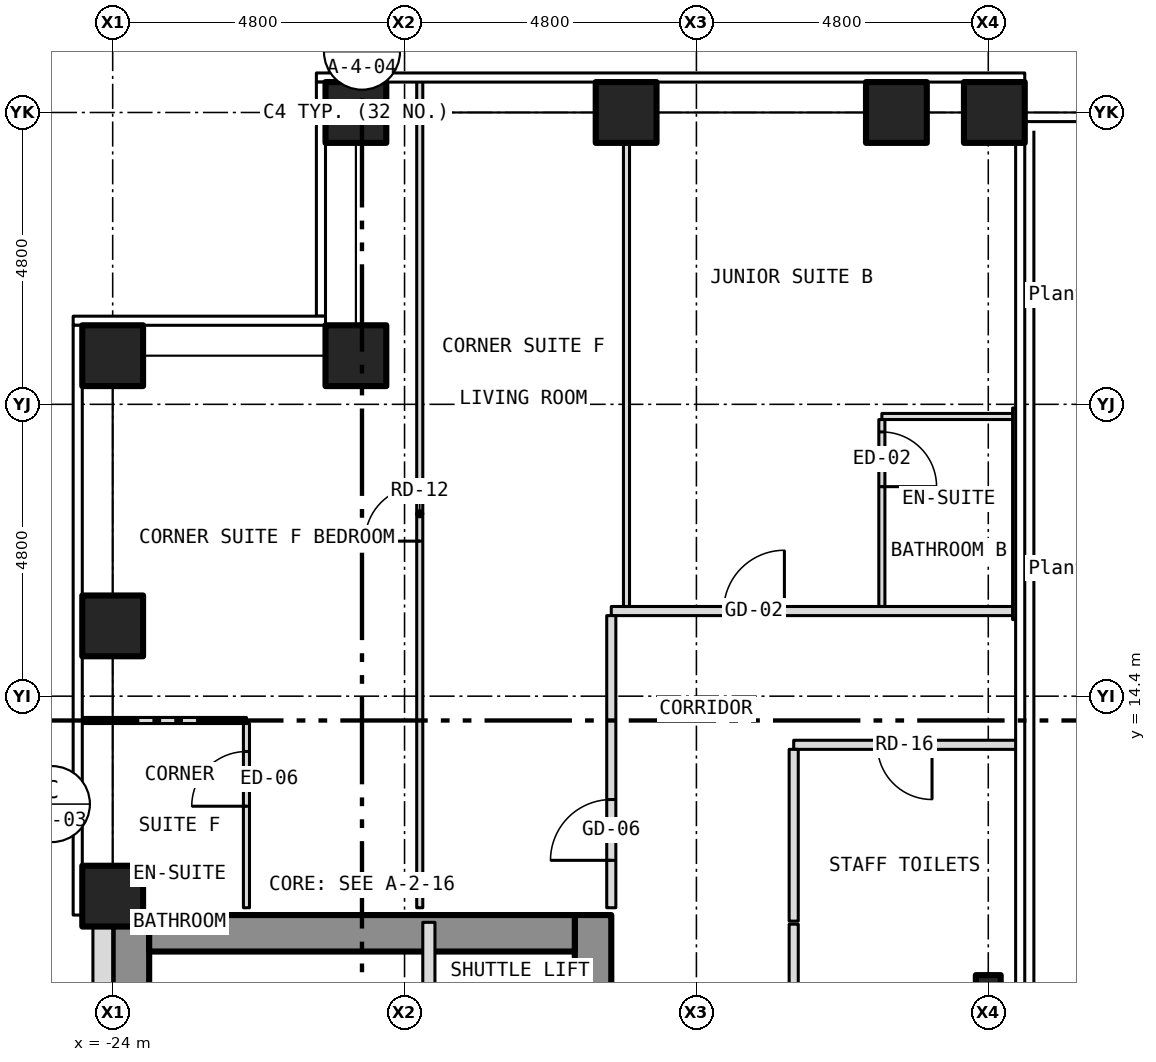
"""IFC4 building model, lengths in metres.
Left out: names, types, materials, properties, quantities, classifications, styles, units other than length and angle.
Written with IfcOpenShell. Run it as: python <this file> out.ifc"""

import sys

from ifc_helpers import new_model, si_unit, direction, frame, frame_2d, origin, origin_2d, place, context, subcontext, project, spatial, rectangle, hollow_rectangle, i_section, extrude, element, fill, save


model = new_model("IFC4")
c1 = context("Model", 3, precision=1e-05, world=origin(), true_north=direction((0.0, 1.0)))
c2 = subcontext(c1, "Body", "Model", "MODEL_VIEW")
j1 = project(units=[si_unit("LENGTHUNIT", "METRE"), si_unit("PLANEANGLEUNIT", "RADIAN")], contexts=[c1])
p1 = place(None, origin())
s1 = spatial("IfcSite", under=j1, at=p1, CompositionType="ELEMENT")
p2 = place(p1, origin())
s2 = spatial("IfcBuilding", under=s1, at=p2, CompositionType="ELEMENT")
p3 = place(p2, frame((0.0, 0.0, 60.0)))
s3 = spatial("IfcBuildingStorey", under=s2, at=p3, CompositionType="ELEMENT", Elevation=60.0)
for number, where, z_axis, x_axis in (
    (1, (-20.0, 24.0, -0.15), (0.0, 0.0, 1.0), (1.0, 0.0, 0.0)),
    (2, (-15.556, 24.0, -0.15), (0.0, 0.0, 1.0), (1.0, 0.0, 0.0)),
    (3, (-11.111, 24.0, -0.15), (0.0, 0.0, 1.0), (1.0, 0.0, 0.0)),
    (4, (-24.0, 11.111, -0.15), (0.0, 0.0, 1.0), (1.0, 0.0, 0.0)),
    (5, (-24.0, 15.556, -0.15), (0.0, 0.0, 1.0), (1.0, 0.0, 0.0)),
    (6, (-24.0, 20.0, -0.15), (0.0, 0.0, 1.0), (1.0, 0.0, 0.0)),
    (7, (-20.0, 20.0, -0.15), (0.0, 0.0, 1.0), (1.0, 0.0, 0.0)),
    (8, (-9.5, 24.0, -0.15), (0.0, 0.0, 1.0), (1.0, 0.0, 0.0)),
):
    element("IfcColumn", number, at=place(p3, frame(where, z_axis=z_axis, x_axis=x_axis)), inside=s3, PredefinedType="COLUMN", context=c2, shape_type="SweptSolid", body=[
        extrude(hollow_rectangle(XDim=1.0, YDim=1.0, WallThickness=0.06, at=origin_2d()), origin(), (0.0, 0.0, 1.0), 3.5),
    ])
p4 = place(p3, frame((-9.6, 9.6, -0.15), z_axis=(0.0, 0.0, 1.0), x_axis=(1.0, 0.0, 0.0)))
e9 = element("IfcColumn", 9, at=p4, inside=s3, PredefinedType="COLUMN", context=c2, shape_type="SweptSolid", body=[
    extrude(i_section(OverallWidth=0.409, OverallDepth=0.424, WebThickness=0.033, FlangeThickness=0.052, at=origin_2d()), origin(), (0.0, 0.0, 1.0), 3.5),
])
p5 = place(p3, frame((-16.1, -10.8, 0.0), z_axis=(0.0, 0.0, 1.0), x_axis=(0.0, 1.0, 0.0)))
e10 = element("IfcWall", 10, at=p5, inside=s3, PredefinedType="SHEAR", context=c2, shape_type="SweptSolid", body=[
    extrude(rectangle(XDim=21.6, YDim=0.6, at=frame_2d((10.8, 0.0))), origin(), (0.0, 0.0, 1.0), 3.25),
])
p6 = place(p5, frame((9.4, 0.0, 0.0)))
e11 = element("IfcOpeningElement", 11, at=p6, cuts=e10, PredefinedType="OPENING", context=c2, shape_type="SweptSolid", body=[
    extrude(rectangle(XDim=1.1, YDim=2.1, at=frame_2d((0.55, 1.05))), frame((0.0, 0.312, 0.0), z_axis=(0.0, -1.0, 0.0), x_axis=(1.0, 0.0, 0.0)), (0.0, 0.0, 1.0), 0.624),
])
p7 = place(p5, frame((11.5, 0.0, 0.0)))
e12 = element("IfcOpeningElement", 12, at=p7, cuts=e10, PredefinedType="OPENING", context=c2, shape_type="SweptSolid", body=[
    extrude(rectangle(XDim=1.1, YDim=2.1, at=frame_2d((0.55, 1.05))), frame((0.0, 0.312, 0.0), z_axis=(0.0, -1.0, 0.0), x_axis=(1.0, 0.0, 0.0)), (0.0, 0.0, 1.0), 0.624),
])
p8 = place(p5, frame((13.6, 0.0, 0.0)))
e13 = element("IfcOpeningElement", 13, at=p8, cuts=e10, PredefinedType="OPENING", context=c2, shape_type="SweptSolid", body=[
    extrude(rectangle(XDim=1.1, YDim=2.1, at=frame_2d((0.55, 1.05))), frame((0.0, 0.312, 0.0), z_axis=(0.0, -1.0, 0.0), x_axis=(1.0, 0.0, 0.0)), (0.0, 0.0, 1.0), 0.624),
])
p9 = place(p5, frame((15.7, 0.0, 0.0)))
e14 = element("IfcOpeningElement", 14, at=p9, cuts=e10, PredefinedType="OPENING", context=c2, shape_type="SweptSolid", body=[
    extrude(rectangle(XDim=1.1, YDim=2.1, at=frame_2d((0.55, 1.05))), frame((0.0, 0.312, 0.0), z_axis=(0.0, -1.0, 0.0), x_axis=(1.0, 0.0, 0.0)), (0.0, 0.0, 1.0), 0.624),
])
p10 = place(p5, frame((17.8, 0.0, 0.0)))
e15 = element("IfcOpeningElement", 15, at=p10, cuts=e10, PredefinedType="OPENING", context=c2, shape_type="SweptSolid", body=[
    extrude(rectangle(XDim=1.1, YDim=2.1, at=frame_2d((0.55, 1.05))), frame((0.0, 0.312, 0.0), z_axis=(0.0, -1.0, 0.0), x_axis=(1.0, 0.0, 0.0)), (0.0, 0.0, 1.0), 0.624),
])
p11 = place(p5, frame((0.758, 0.0, 0.0)))
e16 = element("IfcOpeningElement", 16, at=p11, cuts=e10, PredefinedType="OPENING", context=c2, shape_type="SweptSolid", body=[
    extrude(rectangle(XDim=1.1, YDim=2.1, at=frame_2d((0.55, 1.05))), frame((0.0, 0.312, 0.0), z_axis=(0.0, -1.0, 0.0), x_axis=(1.0, 0.0, 0.0)), (0.0, 0.0, 1.0), 0.624),
])
p12 = place(p5, frame((7.5, 0.0, 0.0)))
e17 = element("IfcOpeningElement", 17, at=p12, cuts=e10, PredefinedType="OPENING", context=c2, shape_type="SweptSolid", body=[
    extrude(rectangle(XDim=1.1, YDim=2.1, at=frame_2d((0.55, 1.05))), frame((0.0, 0.312, 0.0), z_axis=(0.0, -1.0, 0.0), x_axis=(1.0, 0.0, 0.0)), (0.0, 0.0, 1.0), 0.624),
])
p13 = place(p3, frame((-23.7, -10.8, 0.0), z_axis=(0.0, 0.0, 1.0), x_axis=(0.0, 1.0, 0.0)))
e18 = element("IfcWall", 18, at=p13, inside=s3, PredefinedType="SHEAR", context=c2, shape_type="SweptSolid", body=[
    extrude(rectangle(XDim=21.6, YDim=0.6, at=frame_2d((10.8, 0.0))), origin(), (0.0, 0.0, 1.0), 3.25),
])
p14 = place(p3, frame((-23.4, 10.5, 0.0), z_axis=(0.0, 0.0, 1.0), x_axis=(1.0, 0.0, 0.0)))
e19 = element("IfcWall", 19, at=p14, inside=s3, PredefinedType="SHEAR", context=c2, shape_type="SweptSolid", body=[
    extrude(rectangle(XDim=7.0, YDim=0.6, at=frame_2d((3.5, 0.0))), origin(), (0.0, 0.0, 1.0), 3.25),
])
p15 = place(p3, frame((-24.163, 10.8, 0.0), z_axis=(0.0, 0.0, 1.0), x_axis=(0.0, -1.0, 0.0)))
e20 = element("IfcWall", 20, at=p15, inside=s3, PredefinedType="SOLIDWALL", context=c2, shape_type="SweptSolid", body=[
    extrude(rectangle(XDim=21.6, YDim=0.325, at=frame_2d((10.8, 0.0))), origin(), (0.0, 0.0, 1.0), 3.5),
])
p16 = place(p15, frame((18.05, 0.0, 1.0)))
e21 = element("IfcOpeningElement", 21, at=p16, cuts=e20, PredefinedType="OPENING", context=c2, shape_type="SweptSolid", body=[
    extrude(rectangle(XDim=0.6, YDim=1.5, at=frame_2d((0.3, 0.75))), frame((0.0, 0.175, 0.0), z_axis=(0.0, -1.0, 0.0), x_axis=(1.0, 0.0, 0.0)), (0.0, 0.0, 1.0), 0.349),
])
p17 = place(p3, frame((-12.8, 13.6, 0.0), z_axis=(0.0, 0.0, 1.0), x_axis=(1.0, 0.0, 0.0)))
e22 = element("IfcWall", 22, at=p17, inside=s3, PredefinedType="PARTITIONING", context=c2, shape_type="SweptSolid", body=[
    extrude(rectangle(XDim=3.68, YDim=0.15, at=frame_2d((1.84, 0.0))), origin(), (0.0, 0.0, 1.0), 3.35),
])
p18 = place(p17, frame((1.375, 0.0, 0.0)))
e23 = element("IfcOpeningElement", 23, at=p18, cuts=e22, PredefinedType="OPENING", context=c2, shape_type="SweptSolid", body=[
    extrude(rectangle(XDim=0.9, YDim=2.1, at=frame_2d((0.45, 1.05))), frame((0.0, 0.087, 0.0), z_axis=(0.0, -1.0, 0.0), x_axis=(1.0, 0.0, 0.0)), (0.0, 0.0, 1.0), 0.174),
])
p19 = place(p3, frame((-24.53, 14.0, 0.0), z_axis=(0.0, 0.0, 1.0), x_axis=(1.0, 0.0, 0.0)))
e24 = element("IfcWall", 24, at=p19, inside=s3, PredefinedType="PARTITIONING", context=c2, shape_type="SweptSolid", body=[
    extrude(rectangle(XDim=2.73, YDim=0.1, at=frame_2d((1.365, 0.0))), origin(), (0.0, 0.0, 1.0), 3.35),
])
p20 = place(p3, frame((-15.8, 15.8, 0.0), z_axis=(0.0, 0.0, 1.0), x_axis=(1.0, 0.0, 0.0)))
e25 = element("IfcWall", 25, at=p20, inside=s3, PredefinedType="PARTITIONING", context=c2, shape_type="SweptSolid", body=[
    extrude(rectangle(XDim=6.65, YDim=0.15, at=frame_2d((3.325, 0.0))), origin(), (0.0, 0.0, 1.0), 3.35),
])
p21 = place(p20, frame((1.847, 0.0, 0.0)))
e26 = element("IfcOpeningElement", 26, at=p21, cuts=e25, PredefinedType="OPENING", context=c2, shape_type="SweptSolid", body=[
    extrude(rectangle(XDim=1.0, YDim=2.1, at=frame_2d((0.5, 1.05))), frame((0.0, 0.087, 0.0), z_axis=(0.0, -1.0, 0.0), x_axis=(1.0, 0.0, 0.0)), (0.0, 0.0, 1.0), 0.174),
])
p22 = place(p3, frame((-11.35, 19.0, 0.0), z_axis=(0.0, 0.0, 1.0), x_axis=(1.0, 0.0, 0.0)))
e27 = element("IfcWall", 27, at=p22, inside=s3, PredefinedType="PARTITIONING", context=c2, shape_type="SweptSolid", body=[
    extrude(rectangle(XDim=2.2, YDim=0.1, at=frame_2d((1.1, 0.0))), origin(), (0.0, 0.0, 1.0), 3.35),
])
p23 = place(p3, frame((-21.8, 10.92, 0.0), z_axis=(0.0, 0.0, 1.0), x_axis=(0.0, 1.0, 0.0)))
e28 = element("IfcWall", 28, at=p23, inside=s3, PredefinedType="PARTITIONING", context=c2, shape_type="SweptSolid", body=[
    extrude(rectangle(XDim=3.03, YDim=0.1, at=frame_2d((1.515, 0.0))), origin(), (0.0, 0.0, 1.0), 3.35),
])
p24 = place(p23, frame((1.67, 0.0, 0.0)))
e29 = element("IfcOpeningElement", 29, at=p24, cuts=e28, PredefinedType="OPENING", context=c2, shape_type="SweptSolid", body=[
    extrude(rectangle(XDim=0.9, YDim=2.1, at=frame_2d((0.45, 1.05))), frame((0.0, 0.062, 0.0), z_axis=(0.0, -1.0, 0.0), x_axis=(1.0, 0.0, 0.0)), (0.0, 0.0, 1.0), 0.124),
])
p25 = place(p3, frame((-18.95, 10.92, 0.0), z_axis=(0.0, 0.0, 1.0), x_axis=(0.0, 1.0, 0.0)))
e30 = element("IfcWall", 30, at=p25, inside=s3, PredefinedType="PARTITIONING", context=c2, shape_type="SweptSolid", body=[
    extrude(rectangle(XDim=13.61, YDim=0.1, at=frame_2d((6.805, 0.0))), origin(), (0.0, 0.0, 1.0), 3.35),
])
p26 = place(p25, frame((6.03, 0.0, 0.0)))
e31 = element("IfcOpeningElement", 31, at=p26, cuts=e30, PredefinedType="OPENING", context=c2, shape_type="SweptSolid", body=[
    extrude(rectangle(XDim=0.9, YDim=2.1, at=frame_2d((0.45, 1.05))), frame((0.0, 0.062, 0.0), z_axis=(0.0, -1.0, 0.0), x_axis=(1.0, 0.0, 0.0)), (0.0, 0.0, 1.0), 0.124),
])
p27 = place(p3, frame((-18.8, 6.6, 0.0), z_axis=(0.0, 0.0, 1.0), x_axis=(0.0, 1.0, 0.0)))
e32 = element("IfcWall", 32, at=p27, inside=s3, PredefinedType="PARTITIONING", context=c2, shape_type="SweptSolid", body=[
    extrude(rectangle(XDim=4.08, YDim=0.2, at=frame_2d((2.04, 0.0))), origin(), (0.0, 0.0, 1.0), 3.25),
])
p28 = place(p3, frame((-15.8, 10.92, 0.0), z_axis=(0.0, 0.0, 1.0), x_axis=(0.0, 1.0, 0.0)))
e33 = element("IfcWall", 33, at=p28, inside=s3, PredefinedType="PARTITIONING", context=c2, shape_type="SweptSolid", body=[
    extrude(rectangle(XDim=4.805, YDim=0.15, at=frame_2d((2.403, 0.0))), origin(), (0.0, 0.0, 1.0), 3.35),
])
p29 = place(p28, frame((0.78, 0.0, 0.0)))
e34 = element("IfcOpeningElement", 34, at=p29, cuts=e33, PredefinedType="OPENING", context=c2, shape_type="SweptSolid", body=[
    extrude(rectangle(XDim=1.0, YDim=2.1, at=frame_2d((0.5, 1.05))), frame((0.0, 0.087, 0.0), z_axis=(0.0, -1.0, 0.0), x_axis=(1.0, 0.0, 0.0)), (0.0, 0.0, 1.0), 0.174),
])
p30 = place(p3, frame((-15.55, 15.875, 0.0), z_axis=(0.0, 0.0, 1.0), x_axis=(0.0, 1.0, 0.0)))
e35 = element("IfcWall", 35, at=p30, inside=s3, PredefinedType="PARTITIONING", context=c2, shape_type="SweptSolid", body=[
    extrude(rectangle(XDim=8.005, YDim=0.1, at=frame_2d((4.002, 0.0))), origin(), (0.0, 0.0, 1.0), 3.35),
])
p31 = place(p3, frame((-12.8, 3.375, 0.0), z_axis=(0.0, 0.0, 1.0), x_axis=(0.0, 1.0, 0.0)))
e36 = element("IfcWall", 36, at=p31, inside=s3, PredefinedType="PARTITIONING", context=c2, shape_type="SweptSolid", body=[
    extrude(rectangle(XDim=7.275, YDim=0.15, at=frame_2d((3.637, 0.0))), origin(), (0.0, 0.0, 1.0), 3.35),
])
p32 = place(p31, frame((2.625, 0.0, 0.0)))
e37 = element("IfcOpeningElement", 37, at=p32, cuts=e36, PredefinedType="OPENING", context=c2, shape_type="SweptSolid", body=[
    extrude(rectangle(XDim=0.9, YDim=2.1, at=frame_2d((0.45, 1.05))), frame((0.0, 0.087, 0.0), z_axis=(0.0, -1.0, 0.0), x_axis=(1.0, 0.0, 0.0)), (0.0, 0.0, 1.0), 0.174),
])
p33 = place(p3, frame((-12.8, 10.7, 0.0), z_axis=(0.0, 0.0, 1.0), x_axis=(0.0, 1.0, 0.0)))
e38 = element("IfcWall", 38, at=p33, inside=s3, PredefinedType="PARTITIONING", context=c2, shape_type="SweptSolid", body=[
    extrude(rectangle(XDim=2.825, YDim=0.15, at=frame_2d((1.413, 0.0))), origin(), (0.0, 0.0, 1.0), 3.35),
])
p34 = place(p3, frame((-11.35, 15.875, 0.0), z_axis=(0.0, 0.0, 1.0), x_axis=(0.0, 1.0, 0.0)))
e39 = element("IfcWall", 39, at=p34, inside=s3, PredefinedType="PARTITIONING", context=c2, shape_type="SweptSolid", body=[
    extrude(rectangle(XDim=3.075, YDim=0.1, at=frame_2d((1.538, 0.0))), origin(), (0.0, 0.0, 1.0), 3.35),
])
p35 = place(p34, frame((1.971, 0.0, 0.0)))
e40 = element("IfcOpeningElement", 40, at=p35, cuts=e39, PredefinedType="OPENING", context=c2, shape_type="SweptSolid", body=[
    extrude(rectangle(XDim=0.9, YDim=2.1, at=frame_2d((0.45, 1.05))), frame((0.0, 0.062, 0.0), z_axis=(0.0, -1.0, 0.0), x_axis=(1.0, 0.0, 0.0)), (0.0, 0.0, 1.0), 0.124),
])
p36 = place(p3, frame((-9.15, 15.66, 0.0), z_axis=(0.0, 0.0, 1.0), x_axis=(0.0, 1.0, 0.0)))
e41 = element("IfcWall", 41, at=p36, inside=s3, PredefinedType="PARTITIONING", context=c2, shape_type="SweptSolid", body=[
    extrude(rectangle(XDim=3.48, YDim=0.1, at=frame_2d((1.74, 0.0))), origin(), (0.0, 0.0, 1.0), 2.733),
])
p37 = place(p21, origin())
e42 = element("IfcDoor", 42, at=p37, inside=s3, OperationType="SINGLE_SWING_RIGHT", PredefinedType="DOOR", context=c2, shape_type="SweptSolid", body=[
    extrude(rectangle(XDim=1.0, YDim=2.1, at=frame_2d((0.5, 1.05))), frame((0.0, 0.025, 0.0), z_axis=(0.0, -1.0, 0.0), x_axis=(1.0, 0.0, 0.0)), (0.0, 0.0, 1.0), 0.05),
])
fill(e26, e42)
p38 = place(p35, origin())
e43 = element("IfcDoor", 43, at=p38, inside=s3, OperationType="SINGLE_SWING_LEFT", PredefinedType="DOOR", context=c2, shape_type="SweptSolid", body=[
    extrude(rectangle(XDim=0.9, YDim=2.1, at=frame_2d((0.45, 1.05))), frame((0.0, 0.025, 0.0), z_axis=(0.0, -1.0, 0.0), x_axis=(1.0, 0.0, 0.0)), (0.0, 0.0, 1.0), 0.05),
])
fill(e40, e43)
p39 = place(p29, origin())
e44 = element("IfcDoor", 44, at=p39, inside=s3, OperationType="SINGLE_SWING_LEFT", PredefinedType="DOOR", context=c2, shape_type="SweptSolid", body=[
    extrude(rectangle(XDim=1.0, YDim=2.1, at=frame_2d((0.5, 1.05))), frame((0.0, 0.025, 0.0), z_axis=(0.0, -1.0, 0.0), x_axis=(1.0, 0.0, 0.0)), (0.0, 0.0, 1.0), 0.05),
])
fill(e34, e44)
p40 = place(p26, origin())
e45 = element("IfcDoor", 45, at=p40, inside=s3, OperationType="SINGLE_SWING_LEFT", PredefinedType="DOOR", context=c2, shape_type="SweptSolid", body=[
    extrude(rectangle(XDim=0.9, YDim=2.1, at=frame_2d((0.45, 1.05))), frame((0.0, 0.025, 0.0), z_axis=(0.0, -1.0, 0.0), x_axis=(1.0, 0.0, 0.0)), (0.0, 0.0, 1.0), 0.05),
])
fill(e31, e45)
p41 = place(p24, origin())
e46 = element("IfcDoor", 46, at=p41, inside=s3, OperationType="SINGLE_SWING_LEFT", PredefinedType="DOOR", context=c2, shape_type="SweptSolid", body=[
    extrude(rectangle(XDim=0.9, YDim=2.1, at=frame_2d((0.45, 1.05))), frame((0.0, 0.025, 0.0), z_axis=(0.0, -1.0, 0.0), x_axis=(1.0, 0.0, 0.0)), (0.0, 0.0, 1.0), 0.05),
])
fill(e29, e46)
p42 = place(p18, origin())
e47 = element("IfcDoor", 47, at=p42, inside=s3, OperationType="SINGLE_SWING_RIGHT", PredefinedType="DOOR", context=c2, shape_type="SweptSolid", body=[
    extrude(rectangle(XDim=0.9, YDim=2.1, at=frame_2d((0.45, 1.05))), frame((0.0, 0.025, 0.0), z_axis=(0.0, -1.0, 0.0), x_axis=(1.0, 0.0, 0.0)), (0.0, 0.0, 1.0), 0.05),
])
fill(e23, e47)
save(model, sys.argv[1])
